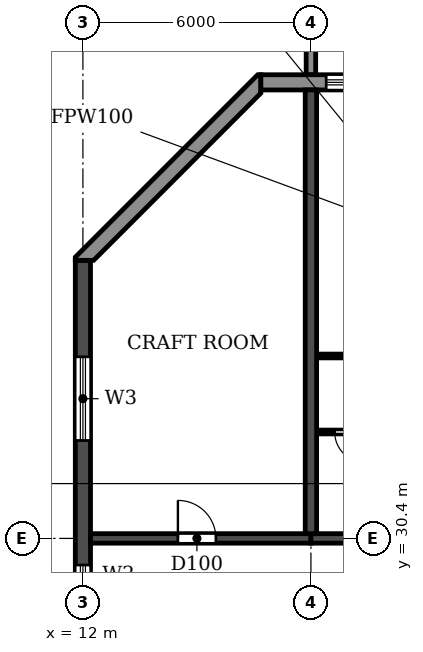
"""IFC4 building model, lengths in metres.
Left out: names, types, materials, properties, quantities, classifications, styles, units other than length and angle.
Written with IfcOpenShell. Run it as: python <this file> out.ifc"""

import sys

from ifc_helpers import new_model, si_unit, direction, frame, frame_2d, origin, place, context, subcontext, project, spatial, polyline, rectangle, outline, extrude, source, transform, mapped, element, fill, save


model = new_model("IFC4")
c1 = context("Model", 3, precision=1e-05, world=origin(), true_north=direction((0.0, 1.0)))
c2 = subcontext(c1, "Body", "Model", "MODEL_VIEW")
j1 = project(units=[si_unit("LENGTHUNIT", "METRE"), si_unit("PLANEANGLEUNIT", "RADIAN")], contexts=[c1])
p1 = place(None, origin())
s1 = spatial("IfcSite", under=j1, at=p1, CompositionType="ELEMENT")
p2 = place(p1, origin())
s2 = spatial("IfcBuilding", under=s1, at=p2, CompositionType="ELEMENT")
p3 = place(p2, frame((0.0, 0.0, 122.4)))
s3 = spatial("IfcBuildingStorey", under=s2, at=p3, CompositionType="ELEMENT", Elevation=122.4)
p4 = place(p3, frame((18.0, 30.525, 0.0), z_axis=(0.0, 0.0, 1.0), x_axis=(0.0, 1.0, 0.0)))
e1 = element("IfcWall", 1, at=p4, inside=s3, PredefinedType="SHEAR", context=c2, shape_type="SweptSolid", body=[
    extrude(rectangle(XDim=11.675, YDim=0.3, at=frame_2d((5.837, 0.0))), origin(), (0.0, 0.0, 1.0), 3.07),
])
p5 = place(p3, frame((12.0, 4.683, 0.0), z_axis=(0.0, 0.0, 1.0), x_axis=(0.0, 1.0, 0.0)))
e2 = element("IfcWall", 2, at=p5, inside=s3, PredefinedType="SHEAR", context=c2, shape_type="SweptSolid", body=[
    extrude(rectangle(XDim=33.034, YDim=0.4, at=frame_2d((16.517, 0.0))), origin(), (0.0, 0.0, 1.0), 3.07),
])
p6 = place(p5, frame((23.817, 0.0, 0.9)))
e3 = element("IfcOpeningElement", 3, at=p6, cuts=e2, PredefinedType="OPENING", context=c2, shape_type="SweptSolid", body=[
    extrude(rectangle(XDim=1.2, YDim=1.5, at=frame_2d((0.6, 0.75))), frame((0.0, 0.21, 0.0), z_axis=(0.0, -1.0, 0.0), x_axis=(1.0, 0.0, 0.0)), (0.0, 0.0, 1.0), 0.42),
])
p7 = place(p5, frame((8.017, 0.0, 0.9)))
e4 = element("IfcOpeningElement", 4, at=p7, cuts=e2, PredefinedType="OPENING", context=c2, shape_type="SweptSolid", body=[
    extrude(rectangle(XDim=1.2, YDim=1.5, at=frame_2d((0.6, 0.75))), frame((0.0, 0.21, 0.0), z_axis=(0.0, -1.0, 0.0), x_axis=(1.0, 0.0, 0.0)), (0.0, 0.0, 1.0), 0.42),
])
p8 = place(p5, frame((28.293, 0.0, 0.6)))
e5 = element("IfcOpeningElement", 5, at=p8, cuts=e2, PredefinedType="OPENING", context=c2, shape_type="SweptSolid", body=[
    extrude(rectangle(XDim=2.2, YDim=1.8, at=frame_2d((1.1, 0.9))), frame((0.0, 0.21, 0.0), z_axis=(0.0, -1.0, 0.0), x_axis=(1.0, 0.0, 0.0)), (0.0, 0.0, 1.0), 0.42),
])
p9 = place(p5, frame((2.541, 0.0, 0.6)))
e6 = element("IfcOpeningElement", 6, at=p9, cuts=e2, PredefinedType="OPENING", context=c2, shape_type="SweptSolid", body=[
    extrude(rectangle(XDim=2.2, YDim=1.8, at=frame_2d((1.1, 0.9))), frame((0.0, 0.21, 0.0), z_axis=(0.0, -1.0, 0.0), x_axis=(1.0, 0.0, 0.0)), (0.0, 0.0, 1.0), 0.42),
])
p10 = place(p5, frame((12.817, 0.0, 0.6)))
e7 = element("IfcOpeningElement", 7, at=p10, cuts=e2, PredefinedType="OPENING", context=c2, shape_type="SweptSolid", body=[
    extrude(rectangle(XDim=2.2, YDim=1.8, at=frame_2d((1.1, 0.9))), frame((0.0, 0.21, 0.0), z_axis=(0.0, -1.0, 0.0), x_axis=(1.0, 0.0, 0.0)), (0.0, 0.0, 1.0), 0.42),
])
p11 = place(p3, frame((12.2, 30.4, 0.0), z_axis=(0.0, 0.0, 1.0), x_axis=(1.0, 0.0, 0.0)))
e8 = element("IfcWall", 8, at=p11, inside=s3, PredefinedType="SHEAR", context=c2, shape_type="SweptSolid", body=[
    extrude(rectangle(XDim=5.8, YDim=0.25, at=frame_2d((2.9, 0.0))), origin(), (0.0, 0.0, 1.0), 2.47),
])
p12 = place(p11, frame((2.3, 0.0, 0.0)))
e9 = element("IfcOpeningElement", 9, at=p12, cuts=e8, PredefinedType="OPENING", context=c2, shape_type="SweptSolid", body=[
    extrude(rectangle(XDim=1.0, YDim=2.1, at=frame_2d((0.5, 1.05))), frame((0.0, 0.135, 0.0), z_axis=(0.0, -1.0, 0.0), x_axis=(1.0, 0.0, 0.0)), (0.0, 0.0, 1.0), 0.27),
])
p13 = place(p3, frame((18.0, 30.4, 0.0), z_axis=(0.0, 0.0, 1.0), x_axis=(1.0, 0.0, 0.0)))
e10 = element("IfcWall", 10, at=p13, inside=s3, PredefinedType="SHEAR", context=c2, shape_type="SweptSolid", body=[
    extrude(rectangle(XDim=6.0, YDim=0.25, at=frame_2d((3.0, 0.0))), origin(), (0.0, 0.0, 1.0), 2.47),
])
p14 = place(p13, frame((2.45, 0.0, 0.0)))
e11 = element("IfcOpeningElement", 11, at=p14, cuts=e10, PredefinedType="OPENING", context=c2, shape_type="SweptSolid", body=[
    extrude(rectangle(XDim=1.0, YDim=2.1, at=frame_2d((0.5, 1.05))), frame((0.0, 0.135, 0.0), z_axis=(0.0, -1.0, 0.0), x_axis=(1.0, 0.0, 0.0)), (0.0, 0.0, 1.0), 0.27),
])
p15 = place(p3, frame((85.317, 42.4, 0.0), z_axis=(0.0, 0.0, 1.0), x_axis=(-1.0, 0.0, 0.0)))
e12 = element("IfcWall", 12, at=p15, inside=s3, PredefinedType="STANDARD", context=c2, shape_type="SweptSolid", body=[
    extrude(rectangle(XDim=68.634, YDim=0.4, at=frame_2d((34.317, 0.0))), origin(), (0.0, 0.0, 1.0), 3.07),
])
p16 = place(p15, frame((64.717, 0.0, 0.9)))
e13 = element("IfcOpeningElement", 13, at=p16, cuts=e12, PredefinedType="OPENING", context=c2, shape_type="SweptSolid", body=[
    extrude(rectangle(XDim=2.2, YDim=1.5, at=frame_2d((1.1, 0.75))), frame((0.0, 0.21, 0.0), z_axis=(0.0, -1.0, 0.0), x_axis=(1.0, 0.0, 0.0)), (0.0, 0.0, 1.0), 0.42),
])
p17 = place(p15, frame((61.917, 0.0, 0.0)))
e14 = element("IfcOpeningElement", 14, at=p17, cuts=e12, PredefinedType="OPENING", context=c2, shape_type="SweptSolid", body=[
    extrude(rectangle(XDim=1.8, YDim=2.4, at=frame_2d((0.9, 1.2))), frame((0.0, 0.21, 0.0), z_axis=(0.0, -1.0, 0.0), x_axis=(1.0, 0.0, 0.0)), (0.0, 0.0, 1.0), 0.42),
])
p18 = place(p15, frame((58.717, 0.0, 0.9)))
e15 = element("IfcOpeningElement", 15, at=p18, cuts=e12, PredefinedType="OPENING", context=c2, shape_type="SweptSolid", body=[
    extrude(rectangle(XDim=2.2, YDim=1.5, at=frame_2d((1.1, 0.75))), frame((0.0, 0.21, 0.0), z_axis=(0.0, -1.0, 0.0), x_axis=(1.0, 0.0, 0.0)), (0.0, 0.0, 1.0), 0.42),
])
p19 = place(p15, frame((55.917, 0.0, 0.0)))
e16 = element("IfcOpeningElement", 16, at=p19, cuts=e12, PredefinedType="OPENING", context=c2, shape_type="SweptSolid", body=[
    extrude(rectangle(XDim=1.8, YDim=2.4, at=frame_2d((0.9, 1.2))), frame((0.0, 0.21, 0.0), z_axis=(0.0, -1.0, 0.0), x_axis=(1.0, 0.0, 0.0)), (0.0, 0.0, 1.0), 0.42),
])
p20 = place(p15, frame((52.717, 0.0, 0.9)))
e17 = element("IfcOpeningElement", 17, at=p20, cuts=e12, PredefinedType="OPENING", context=c2, shape_type="SweptSolid", body=[
    extrude(rectangle(XDim=2.2, YDim=1.5, at=frame_2d((1.1, 0.75))), frame((0.0, 0.21, 0.0), z_axis=(0.0, -1.0, 0.0), x_axis=(1.0, 0.0, 0.0)), (0.0, 0.0, 1.0), 0.42),
])
p21 = place(p15, frame((49.917, 0.0, 0.0)))
e18 = element("IfcOpeningElement", 18, at=p21, cuts=e12, PredefinedType="OPENING", context=c2, shape_type="SweptSolid", body=[
    extrude(rectangle(XDim=1.8, YDim=2.4, at=frame_2d((0.9, 1.2))), frame((0.0, 0.21, 0.0), z_axis=(0.0, -1.0, 0.0), x_axis=(1.0, 0.0, 0.0)), (0.0, 0.0, 1.0), 0.42),
])
p22 = place(p15, frame((46.717, 0.0, 0.9)))
e19 = element("IfcOpeningElement", 19, at=p22, cuts=e12, PredefinedType="OPENING", context=c2, shape_type="SweptSolid", body=[
    extrude(rectangle(XDim=2.2, YDim=1.5, at=frame_2d((1.1, 0.75))), frame((0.0, 0.21, 0.0), z_axis=(0.0, -1.0, 0.0), x_axis=(1.0, 0.0, 0.0)), (0.0, 0.0, 1.0), 0.42),
])
p23 = place(p15, frame((43.917, 0.0, 0.0)))
e20 = element("IfcOpeningElement", 20, at=p23, cuts=e12, PredefinedType="OPENING", context=c2, shape_type="SweptSolid", body=[
    extrude(rectangle(XDim=1.8, YDim=2.4, at=frame_2d((0.9, 1.2))), frame((0.0, 0.21, 0.0), z_axis=(0.0, -1.0, 0.0), x_axis=(1.0, 0.0, 0.0)), (0.0, 0.0, 1.0), 0.42),
])
p24 = place(p15, frame((40.717, 0.0, 0.9)))
e21 = element("IfcOpeningElement", 21, at=p24, cuts=e12, PredefinedType="OPENING", context=c2, shape_type="SweptSolid", body=[
    extrude(rectangle(XDim=2.2, YDim=1.5, at=frame_2d((1.1, 0.75))), frame((0.0, 0.21, 0.0), z_axis=(0.0, -1.0, 0.0), x_axis=(1.0, 0.0, 0.0)), (0.0, 0.0, 1.0), 0.42),
])
p25 = place(p15, frame((37.717, 0.0, 0.9)))
e22 = element("IfcOpeningElement", 22, at=p25, cuts=e12, PredefinedType="OPENING", context=c2, shape_type="SweptSolid", body=[
    extrude(rectangle(XDim=2.2, YDim=1.5, at=frame_2d((1.1, 0.75))), frame((0.0, 0.21, 0.0), z_axis=(0.0, -1.0, 0.0), x_axis=(1.0, 0.0, 0.0)), (0.0, 0.0, 1.0), 0.42),
])
p26 = place(p15, frame((34.917, 0.0, 0.0)))
e23 = element("IfcOpeningElement", 23, at=p26, cuts=e12, PredefinedType="OPENING", context=c2, shape_type="SweptSolid", body=[
    extrude(rectangle(XDim=1.8, YDim=2.4, at=frame_2d((0.9, 1.2))), frame((0.0, 0.21, 0.0), z_axis=(0.0, -1.0, 0.0), x_axis=(1.0, 0.0, 0.0)), (0.0, 0.0, 1.0), 0.42),
])
p27 = place(p15, frame((31.717, 0.0, 0.9)))
e24 = element("IfcOpeningElement", 24, at=p27, cuts=e12, PredefinedType="OPENING", context=c2, shape_type="SweptSolid", body=[
    extrude(rectangle(XDim=2.2, YDim=1.5, at=frame_2d((1.1, 0.75))), frame((0.0, 0.21, 0.0), z_axis=(0.0, -1.0, 0.0), x_axis=(1.0, 0.0, 0.0)), (0.0, 0.0, 1.0), 0.42),
])
p28 = place(p15, frame((28.717, 0.0, 0.9)))
e25 = element("IfcOpeningElement", 25, at=p28, cuts=e12, PredefinedType="OPENING", context=c2, shape_type="SweptSolid", body=[
    extrude(rectangle(XDim=2.2, YDim=1.5, at=frame_2d((1.1, 0.75))), frame((0.0, 0.21, 0.0), z_axis=(0.0, -1.0, 0.0), x_axis=(1.0, 0.0, 0.0)), (0.0, 0.0, 1.0), 0.42),
])
p29 = place(p15, frame((25.717, 0.0, 0.9)))
e26 = element("IfcOpeningElement", 26, at=p29, cuts=e12, PredefinedType="OPENING", context=c2, shape_type="SweptSolid", body=[
    extrude(rectangle(XDim=2.2, YDim=1.5, at=frame_2d((1.1, 0.75))), frame((0.0, 0.21, 0.0), z_axis=(0.0, -1.0, 0.0), x_axis=(1.0, 0.0, 0.0)), (0.0, 0.0, 1.0), 0.42),
])
p30 = place(p15, frame((22.717, 0.0, 0.9)))
e27 = element("IfcOpeningElement", 27, at=p30, cuts=e12, PredefinedType="OPENING", context=c2, shape_type="SweptSolid", body=[
    extrude(rectangle(XDim=2.2, YDim=1.5, at=frame_2d((1.1, 0.75))), frame((0.0, 0.21, 0.0), z_axis=(0.0, -1.0, 0.0), x_axis=(1.0, 0.0, 0.0)), (0.0, 0.0, 1.0), 0.42),
])
p31 = place(p15, frame((19.917, 0.0, 0.0)))
e28 = element("IfcOpeningElement", 28, at=p31, cuts=e12, PredefinedType="OPENING", context=c2, shape_type="SweptSolid", body=[
    extrude(rectangle(XDim=1.8, YDim=2.4, at=frame_2d((0.9, 1.2))), frame((0.0, 0.21, 0.0), z_axis=(0.0, -1.0, 0.0), x_axis=(1.0, 0.0, 0.0)), (0.0, 0.0, 1.0), 0.42),
])
p32 = place(p15, frame((16.917, 0.0, 0.0)))
e29 = element("IfcOpeningElement", 29, at=p32, cuts=e12, PredefinedType="OPENING", context=c2, shape_type="SweptSolid", body=[
    extrude(rectangle(XDim=1.8, YDim=2.4, at=frame_2d((0.9, 1.2))), frame((0.0, 0.21, 0.0), z_axis=(0.0, -1.0, 0.0), x_axis=(1.0, 0.0, 0.0)), (0.0, 0.0, 1.0), 0.42),
])
p33 = place(p15, frame((13.717, 0.0, 0.9)))
e30 = element("IfcOpeningElement", 30, at=p33, cuts=e12, PredefinedType="OPENING", context=c2, shape_type="SweptSolid", body=[
    extrude(rectangle(XDim=2.2, YDim=1.5, at=frame_2d((1.1, 0.75))), frame((0.0, 0.21, 0.0), z_axis=(0.0, -1.0, 0.0), x_axis=(1.0, 0.0, 0.0)), (0.0, 0.0, 1.0), 0.42),
])
p34 = place(p15, frame((10.717, 0.0, 0.9)))
e31 = element("IfcOpeningElement", 31, at=p34, cuts=e12, PredefinedType="OPENING", context=c2, shape_type="SweptSolid", body=[
    extrude(rectangle(XDim=2.2, YDim=1.5, at=frame_2d((1.1, 0.75))), frame((0.0, 0.21, 0.0), z_axis=(0.0, -1.0, 0.0), x_axis=(1.0, 0.0, 0.0)), (0.0, 0.0, 1.0), 0.42),
])
p35 = place(p15, frame((7.717, 0.0, 0.9)))
e32 = element("IfcOpeningElement", 32, at=p35, cuts=e12, PredefinedType="OPENING", context=c2, shape_type="SweptSolid", body=[
    extrude(rectangle(XDim=2.2, YDim=1.5, at=frame_2d((1.1, 0.75))), frame((0.0, 0.21, 0.0), z_axis=(0.0, -1.0, 0.0), x_axis=(1.0, 0.0, 0.0)), (0.0, 0.0, 1.0), 0.42),
])
p36 = place(p15, frame((4.917, 0.0, 0.0)))
e33 = element("IfcOpeningElement", 33, at=p36, cuts=e12, PredefinedType="OPENING", context=c2, shape_type="SweptSolid", body=[
    extrude(rectangle(XDim=1.8, YDim=2.4, at=frame_2d((0.9, 1.2))), frame((0.0, 0.21, 0.0), z_axis=(0.0, -1.0, 0.0), x_axis=(1.0, 0.0, 0.0)), (0.0, 0.0, 1.0), 0.42),
])
p37 = place(p15, frame((1.717, 0.0, 0.9)))
e34 = element("IfcOpeningElement", 34, at=p37, cuts=e12, PredefinedType="OPENING", context=c2, shape_type="SweptSolid", body=[
    extrude(rectangle(XDim=2.2, YDim=1.5, at=frame_2d((1.1, 0.75))), frame((0.0, 0.21, 0.0), z_axis=(0.0, -1.0, 0.0), x_axis=(1.0, 0.0, 0.0)), (0.0, 0.0, 1.0), 0.42),
])
p38 = place(p3, origin())
e35 = element("IfcWall", 35, at=p38, inside=s3, PredefinedType="STANDARD", context=c2, shape_type="SweptSolid", body=[
    extrude(outline(polyline([(16.683, 42.6), (16.6, 42.6), (11.8, 37.8), (11.8, 37.717), (12.283, 37.717), (16.683, 42.117), (16.683, 42.6)])), origin(), (0.0, 0.0, 1.0), 3.07),
])
m1 = source(origin(), c2, "Body", "SweptSolid", [
    extrude(outline(polyline([(0.0, 0.0), (0.25, 0.0), (0.25, 3.1), (0.0, 3.1), (0.0, 0.0)])), origin(), (0.0, 0.0, 1.0), 3.1),
])
p39 = place(p3, frame((17.875, 42.6, 0.0)))
e36 = element("IfcWall", 36, at=p39, inside=s3, PredefinedType="STANDARD", context=c2, shape_type="MappedRepresentation", body=[
    mapped(m1, transform((0.0, 0.0, 0.0))),
])
p40 = place(p3, frame((18.16, 33.2, 0.0), z_axis=(0.0, 0.0, 1.0), x_axis=(1.0, 0.0, 0.0)))
e37 = element("IfcWall", 37, at=p40, inside=s3, PredefinedType="PARTITIONING", context=c2, shape_type="SweptSolid", body=[
    extrude(rectangle(XDim=1.94, YDim=0.1, at=frame_2d((0.97, 0.0))), origin(), (0.0, 0.0, 1.0), 3.07),
])
p41 = place(p40, frame((0.465, 0.0, 0.0)))
e38 = element("IfcOpeningElement", 38, at=p41, cuts=e37, PredefinedType="OPENING", context=c2, shape_type="SweptSolid", body=[
    extrude(rectangle(XDim=0.8, YDim=2.1, at=frame_2d((0.4, 1.05))), frame((0.0, 0.06, 0.0), z_axis=(0.0, -1.0, 0.0), x_axis=(1.0, 0.0, 0.0)), (0.0, 0.0, 1.0), 0.12),
])
p42 = place(p3, frame((18.16, 35.2, 0.0), z_axis=(0.0, 0.0, 1.0), x_axis=(1.0, 0.0, 0.0)))
e39 = element("IfcWall", 39, at=p42, inside=s3, PredefinedType="PARTITIONING", context=c2, shape_type="SweptSolid", body=[
    extrude(rectangle(XDim=2.89, YDim=0.1, at=frame_2d((1.445, 0.0))), origin(), (0.0, 0.0, 1.0), 3.07),
])
p43 = place(p42, frame((1.44, 0.0, 0.0)))
e40 = element("IfcOpeningElement", 40, at=p43, cuts=e39, PredefinedType="OPENING", context=c2, shape_type="SweptSolid", body=[
    extrude(rectangle(XDim=0.9, YDim=2.1, at=frame_2d((0.45, 1.05))), frame((0.0, 0.06, 0.0), z_axis=(0.0, -1.0, 0.0), x_axis=(1.0, 0.0, 0.0)), (0.0, 0.0, 1.0), 0.12),
])
p44 = place(p16, origin())
e41 = element("IfcWindow", 41, at=p44, inside=s3, PartitioningType="DOUBLE_PANEL_HORIZONTAL", PredefinedType="WINDOW", context=c2, shape_type="SweptSolid", body=[
    extrude(rectangle(XDim=2.2, YDim=1.5, at=frame_2d((1.1, 0.75))), frame((0.0, 0.03, 0.0), z_axis=(0.0, -1.0, 0.0), x_axis=(1.0, 0.0, 0.0)), (0.0, 0.0, 1.0), 0.06),
])
fill(e13, e41)
p45 = place(p6, origin())
e42 = element("IfcWindow", 42, at=p45, inside=s3, PartitioningType="SINGLE_PANEL", PredefinedType="WINDOW", context=c2, shape_type="SweptSolid", body=[
    extrude(rectangle(XDim=1.2, YDim=1.5, at=frame_2d((0.6, 0.75))), frame((0.0, 0.03, 0.0), z_axis=(0.0, -1.0, 0.0), x_axis=(1.0, 0.0, 0.0)), (0.0, 0.0, 1.0), 0.06),
])
fill(e3, e42)
p46 = place(p8, origin())
e43 = element("IfcWindow", 43, at=p46, inside=s3, PartitioningType="DOUBLE_PANEL_HORIZONTAL", PredefinedType="WINDOW", context=c2, shape_type="SweptSolid", body=[
    extrude(rectangle(XDim=2.2, YDim=1.8, at=frame_2d((1.1, 0.9))), frame((0.0, 0.03, 0.0), z_axis=(0.0, -1.0, 0.0), x_axis=(1.0, 0.0, 0.0)), (0.0, 0.0, 1.0), 0.06),
])
fill(e5, e43)
p47 = place(p12, origin())
e44 = element("IfcDoor", 44, at=p47, inside=s3, OperationType="SINGLE_SWING_LEFT", PredefinedType="DOOR", context=c2, shape_type="SweptSolid", body=[
    extrude(rectangle(XDim=1.0, YDim=2.1, at=frame_2d((0.5, 1.05))), frame((0.0, 0.025, 0.0), z_axis=(0.0, -1.0, 0.0), x_axis=(1.0, 0.0, 0.0)), (0.0, 0.0, 1.0), 0.05),
])
fill(e9, e44)
p48 = place(p41, frame((0.8, 0.0, 0.0), z_axis=(0.0, 0.0, 1.0), x_axis=(-1.0, 0.0, 0.0)))
e45 = element("IfcDoor", 45, at=p48, inside=s3, OperationType="SINGLE_SWING_LEFT", PredefinedType="DOOR", context=c2, shape_type="SweptSolid", body=[
    extrude(rectangle(XDim=0.8, YDim=2.1, at=frame_2d((0.4, 1.05))), frame((0.0, 0.025, 0.0), z_axis=(0.0, -1.0, 0.0), x_axis=(1.0, 0.0, 0.0)), (0.0, 0.0, 1.0), 0.05),
])
fill(e38, e45)
save(model, sys.argv[1])
